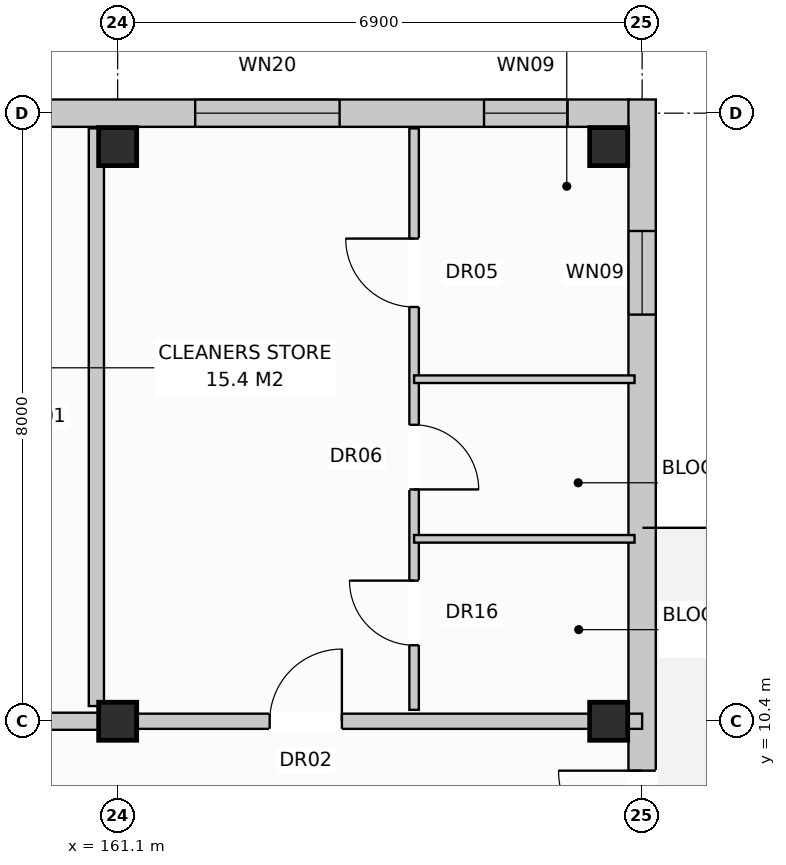
"""IFC4 building model, lengths in metres.
Left out: names, types, materials, properties, quantities, classifications, styles, units other than length and angle.
Written with IfcOpenShell. Run it as: python <this file> out.ifc"""

import sys

from ifc_helpers import new_model, si_unit, direction, frame, frame_2d, origin, origin_with_axes, origin_2d, place, context, subcontext, project, spatial, rectangle, extrude, element, fill, save


model = new_model("IFC4")
c1 = context("Model", 3, precision=1e-05, world=origin(), true_north=direction((0.0, 1.0)))
c2 = subcontext(c1, "Body", "Model", "MODEL_VIEW")
j1 = project(units=[si_unit("LENGTHUNIT", "METRE"), si_unit("PLANEANGLEUNIT", "RADIAN")], contexts=[c1])
p1 = place(None, origin())
s1 = spatial("IfcSite", under=j1, at=p1, CompositionType="ELEMENT")
p2 = place(p1, origin())
s2 = spatial("IfcBuilding", under=s1, at=p2, CompositionType="ELEMENT")
p3 = place(p2, frame((0.0, 0.0, 8.0)))
s3 = spatial("IfcBuildingStorey", under=s2, at=p3, CompositionType="ELEMENT", Elevation=8.0)
for number, where, z_axis, x_axis in (
    (1, (161.1, 10.4, 0.0), (0.0, 0.0, 1.0), (1.0, 0.0, 0.0)),
    (2, (161.1, 17.96, 0.0), (0.0, 0.0, 1.0), (1.0, 0.0, 0.0)),
    (3, (167.56, 10.4, 0.0), (0.0, 0.0, 1.0), (1.0, 0.0, 0.0)),
    (4, (167.56, 17.96, 0.0), (0.0, 0.0, 1.0), (1.0, 0.0, 0.0)),
):
    element("IfcColumn", number, at=place(p3, frame(where, z_axis=z_axis, x_axis=x_axis)), inside=s3, PredefinedType="COLUMN", context=c2, shape_type="SweptSolid", body=[
        extrude(rectangle(XDim=0.5, YDim=0.5, at=origin_2d()), origin(), (0.0, 0.0, 1.0), 3.2),
    ])
p4 = place(p3, frame((150.95, 18.4, 0.0), z_axis=(0.0, 0.0, 1.0), x_axis=(1.0, 0.0, 0.0)))
e5 = element("IfcWall", 5, at=p4, inside=s3, PredefinedType="STANDARD", context=c2, shape_type="SweptSolid", body=[
    extrude(rectangle(XDim=16.88, YDim=0.36, at=frame_2d((8.44, 0.0))), origin(), (0.0, 0.0, 1.0), 2.94),
])
p5 = place(p4, frame((11.17, 0.0, 0.8)))
e6 = element("IfcOpeningElement", 6, at=p5, cuts=e5, PredefinedType="OPENING", context=c2, shape_type="SweptSolid", body=[
    extrude(rectangle(XDim=1.9, YDim=1.85, at=frame_2d((0.95, 0.925))), frame((0.0, 0.192, 0.0), z_axis=(0.0, -1.0, 0.0), x_axis=(1.0, 0.0, 0.0)), (0.0, 0.0, 1.0), 0.384),
])
p6 = place(p4, frame((14.97, 0.0, 0.72)))
e7 = element("IfcOpeningElement", 7, at=p6, cuts=e5, PredefinedType="OPENING", context=c2, shape_type="SweptSolid", body=[
    extrude(rectangle(XDim=1.1, YDim=1.5, at=frame_2d((0.55, 0.75))), frame((0.0, 0.192, 0.0), z_axis=(0.0, -1.0, 0.0), x_axis=(1.0, 0.0, 0.0)), (0.0, 0.0, 1.0), 0.384),
])
p7 = place(p3, frame((168.0, -0.18, 0.0), z_axis=(0.0, 0.0, 1.0), x_axis=(0.0, 1.0, 0.0)))
e8 = element("IfcWall", 8, at=p7, inside=s3, PredefinedType="STANDARD", context=c2, shape_type="SweptSolid", body=[
    extrude(rectangle(XDim=18.76, YDim=0.36, at=frame_2d((9.38, 0.0))), origin(), (0.0, 0.0, 1.0), 2.94),
])
p8 = place(p7, frame((8.83, 0.0, 0.0)))
e9 = element("IfcOpeningElement", 9, at=p8, cuts=e8, PredefinedType="OPENING", context=c2, shape_type="SweptSolid", body=[
    extrude(rectangle(XDim=1.1, YDim=2.1, at=frame_2d((0.55, 1.05))), frame((0.0, 0.192, 0.0), z_axis=(0.0, -1.0, 0.0), x_axis=(1.0, 0.0, 0.0)), (0.0, 0.0, 1.0), 0.384),
])
p9 = place(p7, frame((1.73, 0.0, 0.72)))
e10 = element("IfcOpeningElement", 10, at=p9, cuts=e8, PredefinedType="OPENING", context=c2, shape_type="SweptSolid", body=[
    extrude(rectangle(XDim=1.1, YDim=1.5, at=frame_2d((0.55, 0.75))), frame((0.0, 0.192, 0.0), z_axis=(0.0, -1.0, 0.0), x_axis=(1.0, 0.0, 0.0)), (0.0, 0.0, 1.0), 0.384),
])
p10 = place(p7, frame((15.93, 0.0, 0.72)))
e11 = element("IfcOpeningElement", 11, at=p10, cuts=e8, PredefinedType="OPENING", context=c2, shape_type="SweptSolid", body=[
    extrude(rectangle(XDim=1.1, YDim=1.5, at=frame_2d((0.55, 0.75))), frame((0.0, 0.192, 0.0), z_axis=(0.0, -1.0, 0.0), x_axis=(1.0, 0.0, 0.0)), (0.0, 0.0, 1.0), 0.384),
])
p11 = place(p3, frame((160.82, 10.6, 0.0), z_axis=(0.0, 0.0, 1.0), x_axis=(0.0, 1.0, 0.0)))
e12 = element("IfcWall", 12, at=p11, inside=s3, PredefinedType="PARTITIONING", context=c2, shape_type="SweptSolid", body=[
    extrude(rectangle(XDim=7.6, YDim=0.2, at=frame_2d((3.8, 0.0))), origin(), (0.0, 0.0, 1.0), 2.38),
])
p12 = place(p3, frame((151.1, 10.4, 0.0), z_axis=(0.0, 0.0, 1.0), x_axis=(1.0, 0.0, 0.0)))
e13 = element("IfcWall", 13, at=p12, inside=s3, PredefinedType="PARTITIONING", context=c2, shape_type="SweptSolid", body=[
    extrude(rectangle(XDim=10.0, YDim=0.225, at=frame_2d((5.0, 0.0))), origin(), (0.0, 0.0, 1.0), 2.38),
])
p13 = place(p12, frame((0.475, 0.0, 0.0)))
e14 = element("IfcOpeningElement", 14, at=p13, cuts=e13, PredefinedType="OPENING", context=c2, shape_type="SweptSolid", body=[
    extrude(rectangle(XDim=1.1, YDim=2.15, at=frame_2d((0.55, 1.075))), frame((0.0, 0.125, 0.0), z_axis=(0.0, -1.0, 0.0), x_axis=(1.0, 0.0, 0.0)), (0.0, 0.0, 1.0), 0.249),
])
p14 = place(p12, frame((5.85, 0.0, 0.0)))
e15 = element("IfcOpeningElement", 15, at=p14, cuts=e13, PredefinedType="OPENING", context=c2, shape_type="SweptSolid", body=[
    extrude(rectangle(XDim=0.9, YDim=2.1, at=frame_2d((0.45, 1.05))), frame((0.0, 0.125, 0.0), z_axis=(0.0, -1.0, 0.0), x_axis=(1.0, 0.0, 0.0)), (0.0, 0.0, 1.0), 0.249),
])
p15 = place(p12, frame((7.9, 0.0, 0.0)))
e16 = element("IfcOpeningElement", 16, at=p15, cuts=e13, PredefinedType="OPENING", context=c2, shape_type="SweptSolid", body=[
    extrude(rectangle(XDim=0.95, YDim=2.15, at=frame_2d((0.475, 1.075))), frame((0.0, 0.125, 0.0), z_axis=(0.0, -1.0, 0.0), x_axis=(1.0, 0.0, 0.0)), (0.0, 0.0, 1.0), 0.249),
])
p16 = place(p3, frame((161.1, 10.4, 0.0), z_axis=(0.0, 0.0, 1.0), x_axis=(1.0, 0.0, 0.0)))
e17 = element("IfcWall", 17, at=p16, inside=s3, PredefinedType="PARTITIONING", context=c2, shape_type="SweptSolid", body=[
    extrude(rectangle(XDim=6.9, YDim=0.2, at=frame_2d((3.45, 0.0))), origin(), (0.0, 0.0, 1.0), 2.38),
])
p17 = place(p16, frame((2.0, 0.0, 0.0)))
e18 = element("IfcOpeningElement", 18, at=p17, cuts=e17, PredefinedType="OPENING", context=c2, shape_type="SweptSolid", body=[
    extrude(rectangle(XDim=0.95, YDim=2.15, at=frame_2d((0.475, 1.075))), frame((0.0, 0.112, 0.0), z_axis=(0.0, -1.0, 0.0), x_axis=(1.0, 0.0, 0.0)), (0.0, 0.0, 1.0), 0.224),
])
p18 = place(p3, frame((165.0, 10.55, 0.0), z_axis=(0.0, 0.0, 1.0), x_axis=(0.0, 1.0, 0.0)))
e19 = element("IfcWall", 19, at=p18, inside=s3, PredefinedType="PARTITIONING", context=c2, shape_type="SweptSolid", body=[
    extrude(rectangle(XDim=7.65, YDim=0.125, at=frame_2d((3.825, 0.0))), origin(), (0.0, 0.0, 1.0), 2.94),
])
p19 = place(p18, frame((0.85, 0.0, 0.0)))
e20 = element("IfcOpeningElement", 20, at=p19, cuts=e19, PredefinedType="OPENING", context=c2, shape_type="SweptSolid", body=[
    extrude(rectangle(XDim=0.85, YDim=2.1, at=frame_2d((0.425, 1.05))), frame((0.0, 0.074, 0.0), z_axis=(0.0, -1.0, 0.0), x_axis=(1.0, 0.0, 0.0)), (0.0, 0.0, 1.0), 0.149),
])
p20 = place(p18, frame((2.9, 0.0, 0.0)))
e21 = element("IfcOpeningElement", 21, at=p20, cuts=e19, PredefinedType="OPENING", context=c2, shape_type="SweptSolid", body=[
    extrude(rectangle(XDim=0.85, YDim=2.05, at=frame_2d((0.425, 1.025))), frame((0.0, 0.074, 0.0), z_axis=(0.0, -1.0, 0.0), x_axis=(1.0, 0.0, 0.0)), (0.0, 0.0, 1.0), 0.149),
])
p21 = place(p18, frame((5.3, 0.0, 0.0)))
e22 = element("IfcOpeningElement", 22, at=p21, cuts=e19, PredefinedType="OPENING", context=c2, shape_type="SweptSolid", body=[
    extrude(rectangle(XDim=0.9, YDim=2.1, at=frame_2d((0.45, 1.05))), frame((0.0, 0.074, 0.0), z_axis=(0.0, -1.0, 0.0), x_axis=(1.0, 0.0, 0.0)), (0.0, 0.0, 1.0), 0.149),
])
for number, where, z_axis, x_axis in (
    (23, (165.0, 12.8, 0.0), (0.0, 0.0, 1.0), (1.0, 0.0, 0.0)),
    (24, (165.0, 14.9, 0.0), (0.0, 0.0, 1.0), (1.0, 0.0, 0.0)),
):
    element("IfcWall", number, at=place(p3, frame(where, z_axis=z_axis, x_axis=x_axis)), inside=s3, PredefinedType="PARTITIONING", context=c2, shape_type="SweptSolid", body=[
        extrude(rectangle(XDim=2.9, YDim=0.1, at=frame_2d((1.45, 0.0))), origin(), (0.0, 0.0, 1.0), 2.94),
    ])
p22 = place(p5, origin_with_axes())
e25 = element("IfcWindow", 25, at=p22, inside=s3, PartitioningType="SINGLE_PANEL", PredefinedType="WINDOW", context=c2, shape_type="SweptSolid", body=[
    extrude(rectangle(XDim=1.9, YDim=1.85, at=frame_2d((0.95, 0.925))), frame((0.0, 0.03, 0.0), z_axis=(0.0, -1.0, 0.0), x_axis=(1.0, 0.0, 0.0)), (0.0, 0.0, 1.0), 0.06),
])
fill(e6, e25)
p23 = place(p6, origin_with_axes())
e26 = element("IfcWindow", 26, at=p23, inside=s3, PartitioningType="SINGLE_PANEL", PredefinedType="WINDOW", context=c2, shape_type="SweptSolid", body=[
    extrude(rectangle(XDim=1.1, YDim=1.5, at=frame_2d((0.55, 0.75))), frame((0.0, 0.03, 0.0), z_axis=(0.0, -1.0, 0.0), x_axis=(1.0, 0.0, 0.0)), (0.0, 0.0, 1.0), 0.06),
])
fill(e7, e26)
p24 = place(p8, origin_with_axes())
e27 = element("IfcDoor", 27, at=p24, inside=s3, OperationType="SINGLE_SWING_RIGHT", PredefinedType="DOOR", context=c2, shape_type="SweptSolid", body=[
    extrude(rectangle(XDim=1.1, YDim=2.1, at=frame_2d((0.55, 1.05))), frame((0.0, 0.025, 0.0), z_axis=(0.0, -1.0, 0.0), x_axis=(1.0, 0.0, 0.0)), (0.0, 0.0, 1.0), 0.05),
])
fill(e9, e27)
p25 = place(p10, origin_with_axes())
e28 = element("IfcWindow", 28, at=p25, inside=s3, PartitioningType="SINGLE_PANEL", PredefinedType="WINDOW", context=c2, shape_type="SweptSolid", body=[
    extrude(rectangle(XDim=1.1, YDim=1.5, at=frame_2d((0.55, 0.75))), frame((0.0, 0.03, 0.0), z_axis=(0.0, -1.0, 0.0), x_axis=(1.0, 0.0, 0.0)), (0.0, 0.0, 1.0), 0.06),
])
fill(e11, e28)
p26 = place(p17, origin_with_axes())
e29 = element("IfcDoor", 29, at=p26, inside=s3, OperationType="SINGLE_SWING_RIGHT", PredefinedType="DOOR", context=c2, shape_type="SweptSolid", body=[
    extrude(rectangle(XDim=0.95, YDim=2.15, at=frame_2d((0.475, 1.075))), frame((0.0, 0.025, 0.0), z_axis=(0.0, -1.0, 0.0), x_axis=(1.0, 0.0, 0.0)), (0.0, 0.0, 1.0), 0.05),
])
fill(e18, e29)
p27 = place(p19, origin_with_axes())
e30 = element("IfcDoor", 30, at=p27, inside=s3, OperationType="SINGLE_SWING_RIGHT", PredefinedType="DOOR", context=c2, shape_type="SweptSolid", body=[
    extrude(rectangle(XDim=0.85, YDim=2.1, at=frame_2d((0.425, 1.05))), frame((0.0, 0.025, 0.0), z_axis=(0.0, -1.0, 0.0), x_axis=(1.0, 0.0, 0.0)), (0.0, 0.0, 1.0), 0.05),
])
fill(e20, e30)
p28 = place(p20, frame((0.85, 0.0, 0.0), z_axis=(0.0, 0.0, 1.0), x_axis=(-1.0, 0.0, 0.0)))
e31 = element("IfcDoor", 31, at=p28, inside=s3, OperationType="SINGLE_SWING_LEFT", PredefinedType="DOOR", context=c2, shape_type="SweptSolid", body=[
    extrude(rectangle(XDim=0.85, YDim=2.05, at=frame_2d((0.425, 1.025))), frame((0.0, 0.025, 0.0), z_axis=(0.0, -1.0, 0.0), x_axis=(1.0, 0.0, 0.0)), (0.0, 0.0, 1.0), 0.05),
])
fill(e21, e31)
p29 = place(p21, origin_with_axes())
e32 = element("IfcDoor", 32, at=p29, inside=s3, OperationType="SINGLE_SWING_RIGHT", PredefinedType="DOOR", context=c2, shape_type="SweptSolid", body=[
    extrude(rectangle(XDim=0.9, YDim=2.1, at=frame_2d((0.45, 1.05))), frame((0.0, 0.025, 0.0), z_axis=(0.0, -1.0, 0.0), x_axis=(1.0, 0.0, 0.0)), (0.0, 0.0, 1.0), 0.05),
])
fill(e22, e32)
save(model, sys.argv[1])
